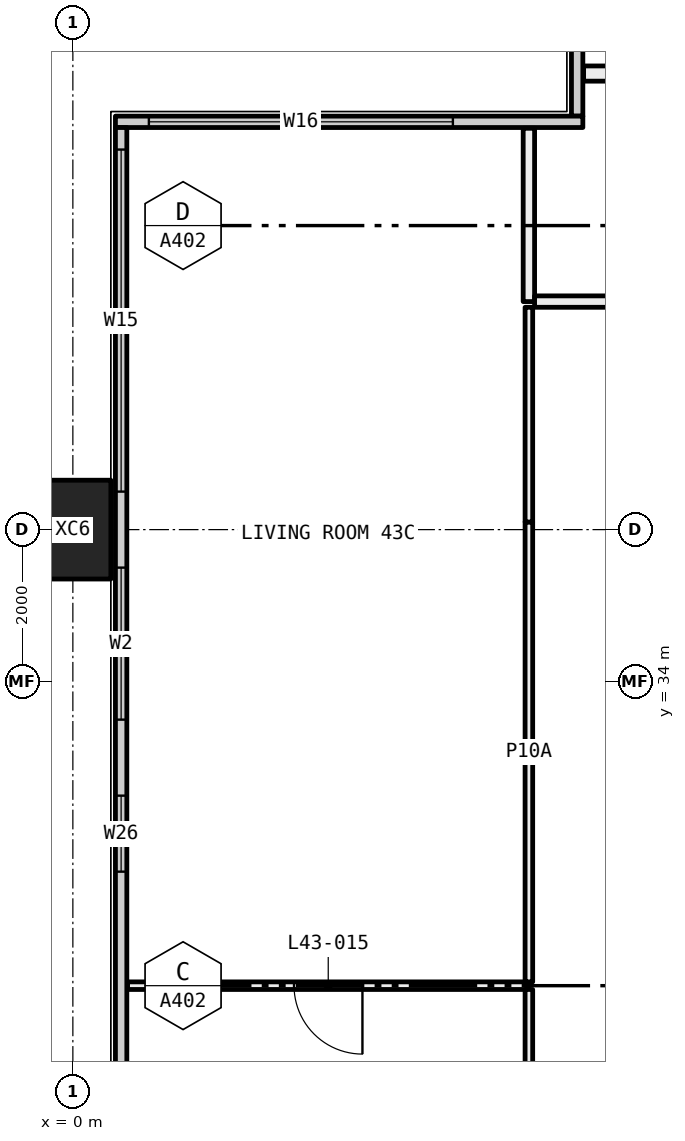
"""IFC4 building model, lengths in metres.
Left out: names, types, materials, properties, quantities, classifications, styles, units other than length and angle.
Written with IfcOpenShell. Run it as: python <this file> out.ifc"""

import sys

from ifc_helpers import new_model, si_unit, direction, frame, frame_2d, origin, origin_2d, place, context, subcontext, project, spatial, rectangle, hollow_rectangle, extrude, element, fill, save


model = new_model("IFC4")
c1 = context("Model", 3, precision=1e-05, world=origin(), true_north=direction((0.0, 1.0)))
c2 = subcontext(c1, "Body", "Model", "MODEL_VIEW")
j1 = project(units=[si_unit("LENGTHUNIT", "METRE"), si_unit("PLANEANGLEUNIT", "RADIAN")], contexts=[c1])
p1 = place(None, origin())
s1 = spatial("IfcSite", under=j1, at=p1, CompositionType="ELEMENT")
p2 = place(p1, origin())
s2 = spatial("IfcBuilding", under=s1, at=p2, CompositionType="ELEMENT")
p3 = place(p2, frame((0.0, 0.0, 165.15)))
s3 = spatial("IfcBuildingStorey", under=s2, at=p3, CompositionType="ELEMENT", Elevation=165.15)
p4 = place(p3, frame((0.0, 36.0, -0.4), z_axis=(0.0, 0.0, 1.0), x_axis=(0.0, 1.0, 0.0)))
e1 = element("IfcColumn", 1, at=p4, inside=s3, PredefinedType="COLUMN", context=c2, shape_type="SweptSolid", body=[
    extrude(hollow_rectangle(XDim=1.3, YDim=1.0, WallThickness=0.05, at=origin_2d()), origin(), (0.0, 0.0, 1.0), 3.45),
])
p5 = place(p3, frame((6.635, 41.44, 0.0), z_axis=(0.0, 0.0, 1.0), x_axis=(0.0, 1.0, 0.0)))
e2 = element("IfcWall", 2, at=p5, inside=s3, PredefinedType="ELEMENTEDWALL", context=c2, shape_type="SweptSolid", body=[
    extrude(rectangle(XDim=5.85, YDim=0.15, at=frame_2d((2.925, 0.0))), origin(), (0.0, 0.0, 1.0), 3.05),
])
p6 = place(p5, frame((1.56, 0.0, 0.45)))
e3 = element("IfcOpeningElement", 3, at=p6, cuts=e2, PredefinedType="OPENING", context=c2, shape_type="SweptSolid", body=[
    extrude(rectangle(XDim=4.0, YDim=2.55, at=frame_2d((2.0, 1.275))), frame((0.0, 0.085, 0.0), z_axis=(0.0, -1.0, 0.0), x_axis=(1.0, 0.0, 0.0)), (0.0, 0.0, 1.0), 0.17),
])
p7 = place(p3, frame((0.56, 41.365, 0.0), z_axis=(0.0, 0.0, 1.0), x_axis=(1.0, 0.0, 0.0)))
e4 = element("IfcWall", 4, at=p7, inside=s3, PredefinedType="ELEMENTEDWALL", context=c2, shape_type="SweptSolid", body=[
    extrude(rectangle(XDim=6.15, YDim=0.15, at=frame_2d((3.075, 0.0))), origin(), (0.0, 0.0, 1.0), 3.05),
])
p8 = place(p7, frame((0.44, 0.0, 0.45)))
e5 = element("IfcOpeningElement", 5, at=p8, cuts=e4, PredefinedType="OPENING", context=c2, shape_type="SweptSolid", body=[
    extrude(rectangle(XDim=4.0, YDim=2.55, at=frame_2d((2.0, 1.275))), frame((0.0, 0.085, 0.0), z_axis=(0.0, -1.0, 0.0), x_axis=(1.0, 0.0, 0.0)), (0.0, 0.0, 1.0), 0.17),
])
p9 = place(p3, frame((0.635, 18.71, 0.0), z_axis=(0.0, 0.0, 1.0), x_axis=(0.0, 1.0, 0.0)))
e6 = element("IfcWall", 6, at=p9, inside=s3, PredefinedType="ELEMENTEDWALL", context=c2, shape_type="SweptSolid", body=[
    extrude(rectangle(XDim=22.58, YDim=0.15, at=frame_2d((11.29, 0.0))), origin(), (0.0, 0.0, 1.0), 3.05),
])
p10 = place(p9, frame((0.29, 0.0, 0.45)))
e7 = element("IfcOpeningElement", 7, at=p10, cuts=e6, PredefinedType="OPENING", context=c2, shape_type="SweptSolid", body=[
    extrude(rectangle(XDim=4.5, YDim=2.55, at=frame_2d((2.25, 1.275))), frame((0.0, 0.085, 0.0), z_axis=(0.0, -1.0, 0.0), x_axis=(1.0, 0.0, 0.0)), (0.0, 0.0, 1.0), 0.17),
])
p11 = place(p9, frame((5.79, 0.0, 0.45)))
e8 = element("IfcOpeningElement", 8, at=p11, cuts=e6, PredefinedType="OPENING", context=c2, shape_type="SweptSolid", body=[
    extrude(rectangle(XDim=4.0, YDim=2.55, at=frame_2d((2.0, 1.275))), frame((0.0, 0.085, 0.0), z_axis=(0.0, -1.0, 0.0), x_axis=(1.0, 0.0, 0.0)), (0.0, 0.0, 1.0), 0.17),
])
p12 = place(p9, frame((12.79, 0.0, 0.45)))
e9 = element("IfcOpeningElement", 9, at=p12, cuts=e6, PredefinedType="OPENING", context=c2, shape_type="SweptSolid", body=[
    extrude(rectangle(XDim=1.0, YDim=2.55, at=frame_2d((0.5, 1.275))), frame((0.0, 0.085, 0.0), z_axis=(0.0, -1.0, 0.0), x_axis=(1.0, 0.0, 0.0)), (0.0, 0.0, 1.0), 0.17),
])
p13 = place(p9, frame((14.79, 0.0, 0.45)))
e10 = element("IfcOpeningElement", 10, at=p13, cuts=e6, PredefinedType="OPENING", context=c2, shape_type="SweptSolid", body=[
    extrude(rectangle(XDim=2.0, YDim=2.55, at=frame_2d((1.0, 1.275))), frame((0.0, 0.085, 0.0), z_axis=(0.0, -1.0, 0.0), x_axis=(1.0, 0.0, 0.0)), (0.0, 0.0, 1.0), 0.17),
])
p14 = place(p9, frame((17.79, 0.0, 0.45)))
e11 = element("IfcOpeningElement", 11, at=p14, cuts=e6, PredefinedType="OPENING", context=c2, shape_type="SweptSolid", body=[
    extrude(rectangle(XDim=4.5, YDim=2.55, at=frame_2d((2.25, 1.275))), frame((0.0, 0.085, 0.0), z_axis=(0.0, -1.0, 0.0), x_axis=(1.0, 0.0, 0.0)), (0.0, 0.0, 1.0), 0.17),
])
p15 = place(p3, frame((6.72, 42.0, 0.0), z_axis=(0.0, 0.0, 1.0), x_axis=(1.0, 0.0, 0.0)))
e12 = element("IfcWall", 12, at=p15, inside=s3, PredefinedType="PARTITIONING", context=c2, shape_type="SweptSolid", body=[
    extrude(rectangle(XDim=3.38, YDim=0.2, at=frame_2d((1.69, 0.0))), origin(), (0.0, 0.0, 1.0), 3.05),
])
p16 = place(p3, frame((6.0, 30.0, 0.0), z_axis=(0.0, 0.0, 1.0), x_axis=(-1.0, 0.0, 0.0)))
e13 = element("IfcWall", 13, at=p16, inside=s3, PredefinedType="PARTITIONING", context=c2, shape_type="SweptSolid", body=[
    extrude(rectangle(XDim=5.28, YDim=0.1, at=frame_2d((2.64, 0.0))), origin(), (0.0, 0.0, 1.0), 3.05),
])
p17 = place(p16, frame((2.19, 0.0, 0.0)))
e14 = element("IfcOpeningElement", 14, at=p17, cuts=e13, PredefinedType="OPENING", context=c2, shape_type="SweptSolid", body=[
    extrude(rectangle(XDim=0.9, YDim=2.1, at=frame_2d((0.45, 1.05))), frame((0.0, 0.06, 0.0), z_axis=(0.0, -1.0, 0.0), x_axis=(1.0, 0.0, 0.0)), (0.0, 0.0, 1.0), 0.12),
])
p18 = place(p3, frame((6.0, 25.5, 0.0), z_axis=(0.0, 0.0, 1.0), x_axis=(0.0, 1.0, 0.0)))
e15 = element("IfcWall", 15, at=p18, inside=s3, PredefinedType="PARTITIONING", context=c2, shape_type="SweptSolid", body=[
    extrude(rectangle(XDim=4.45, YDim=0.1, at=frame_2d((2.225, 0.0))), origin(), (0.0, 0.0, 1.0), 3.05),
])
p19 = place(p3, frame((6.0, 30.05, 0.0), z_axis=(0.0, 0.0, 1.0), x_axis=(0.0, 1.0, 0.0)))
e16 = element("IfcWall", 16, at=p19, inside=s3, PredefinedType="PARTITIONING", context=c2, shape_type="SweptSolid", body=[
    extrude(rectangle(XDim=6.05, YDim=0.1, at=frame_2d((3.025, 0.0))), origin(), (0.0, 0.0, 1.0), 2.45),
])
p20 = place(p3, frame((6.0, 36.1, 0.0), z_axis=(0.0, 0.0, 1.0), x_axis=(0.0, 1.0, 0.0)))
e17 = element("IfcWall", 17, at=p20, inside=s3, PredefinedType="PARTITIONING", context=c2, shape_type="SweptSolid", body=[
    extrude(rectangle(XDim=2.825, YDim=0.1, at=frame_2d((1.413, 0.0))), origin(), (0.0, 0.0, 1.0), 3.05),
])
p21 = place(p3, frame((6.0, 39.0, 0.0), z_axis=(0.0, 0.0, 1.0), x_axis=(0.0, 1.0, 0.0)))
e18 = element("IfcWall", 18, at=p21, inside=s3, PredefinedType="PARTITIONING", context=c2, shape_type="SweptSolid", body=[
    extrude(rectangle(XDim=2.28, YDim=0.15, at=frame_2d((1.14, 0.0))), origin(), (0.0, 0.0, 1.0), 3.05),
])
p22 = place(p3, frame((10.0, 39.0, 0.0), z_axis=(0.0, 0.0, 1.0), x_axis=(-1.0, 0.0, 0.0)))
e19 = element("IfcWall", 19, at=p22, inside=s3, PredefinedType="PARTITIONING", context=c2, shape_type="SweptSolid", body=[
    extrude(rectangle(XDim=3.925, YDim=0.15, at=frame_2d((1.962, 0.0))), origin(), (0.0, 0.0, 1.0), 3.05),
])
p23 = place(p22, frame((1.512, 0.0, 0.0)))
e20 = element("IfcOpeningElement", 20, at=p23, cuts=e19, PredefinedType="OPENING", context=c2, shape_type="SweptSolid", body=[
    extrude(rectangle(XDim=0.9, YDim=2.1, at=frame_2d((0.45, 1.05))), frame((0.0, 0.085, 0.0), z_axis=(0.0, -1.0, 0.0), x_axis=(1.0, 0.0, 0.0)), (0.0, 0.0, 1.0), 0.17),
])
p24 = place(p8, origin())
e21 = element("IfcWindow", 21, at=p24, inside=s3, PartitioningType="SINGLE_PANEL", PredefinedType="WINDOW", context=c2, shape_type="SweptSolid", body=[
    extrude(rectangle(XDim=4.0, YDim=2.55, at=frame_2d((2.0, 1.275))), frame((0.0, 0.03, 0.0), z_axis=(0.0, -1.0, 0.0), x_axis=(1.0, 0.0, 0.0)), (0.0, 0.0, 1.0), 0.06),
])
fill(e5, e21)
p25 = place(p12, origin())
e22 = element("IfcWindow", 22, at=p25, inside=s3, PartitioningType="SINGLE_PANEL", PredefinedType="WINDOW", context=c2, shape_type="SweptSolid", body=[
    extrude(rectangle(XDim=1.0, YDim=2.55, at=frame_2d((0.5, 1.275))), frame((0.0, 0.03, 0.0), z_axis=(0.0, -1.0, 0.0), x_axis=(1.0, 0.0, 0.0)), (0.0, 0.0, 1.0), 0.06),
])
fill(e9, e22)
p26 = place(p13, origin())
e23 = element("IfcWindow", 23, at=p26, inside=s3, PartitioningType="SINGLE_PANEL", PredefinedType="WINDOW", context=c2, shape_type="SweptSolid", body=[
    extrude(rectangle(XDim=2.0, YDim=2.55, at=frame_2d((1.0, 1.275))), frame((0.0, 0.03, 0.0), z_axis=(0.0, -1.0, 0.0), x_axis=(1.0, 0.0, 0.0)), (0.0, 0.0, 1.0), 0.06),
])
fill(e10, e23)
p27 = place(p14, origin())
e24 = element("IfcWindow", 24, at=p27, inside=s3, PartitioningType="SINGLE_PANEL", PredefinedType="WINDOW", context=c2, shape_type="SweptSolid", body=[
    extrude(rectangle(XDim=4.5, YDim=2.55, at=frame_2d((2.25, 1.275))), frame((0.0, 0.03, 0.0), z_axis=(0.0, -1.0, 0.0), x_axis=(1.0, 0.0, 0.0)), (0.0, 0.0, 1.0), 0.06),
])
fill(e11, e24)
p28 = place(p17, origin())
e25 = element("IfcDoor", 25, at=p28, inside=s3, OperationType="SINGLE_SWING_RIGHT", PredefinedType="DOOR", context=c2, shape_type="SweptSolid", body=[
    extrude(rectangle(XDim=0.9, YDim=2.1, at=frame_2d((0.45, 1.05))), frame((0.0, 0.025, 0.0), z_axis=(0.0, -1.0, 0.0), x_axis=(1.0, 0.0, 0.0)), (0.0, 0.0, 1.0), 0.05),
])
fill(e14, e25)
save(model, sys.argv[1])
